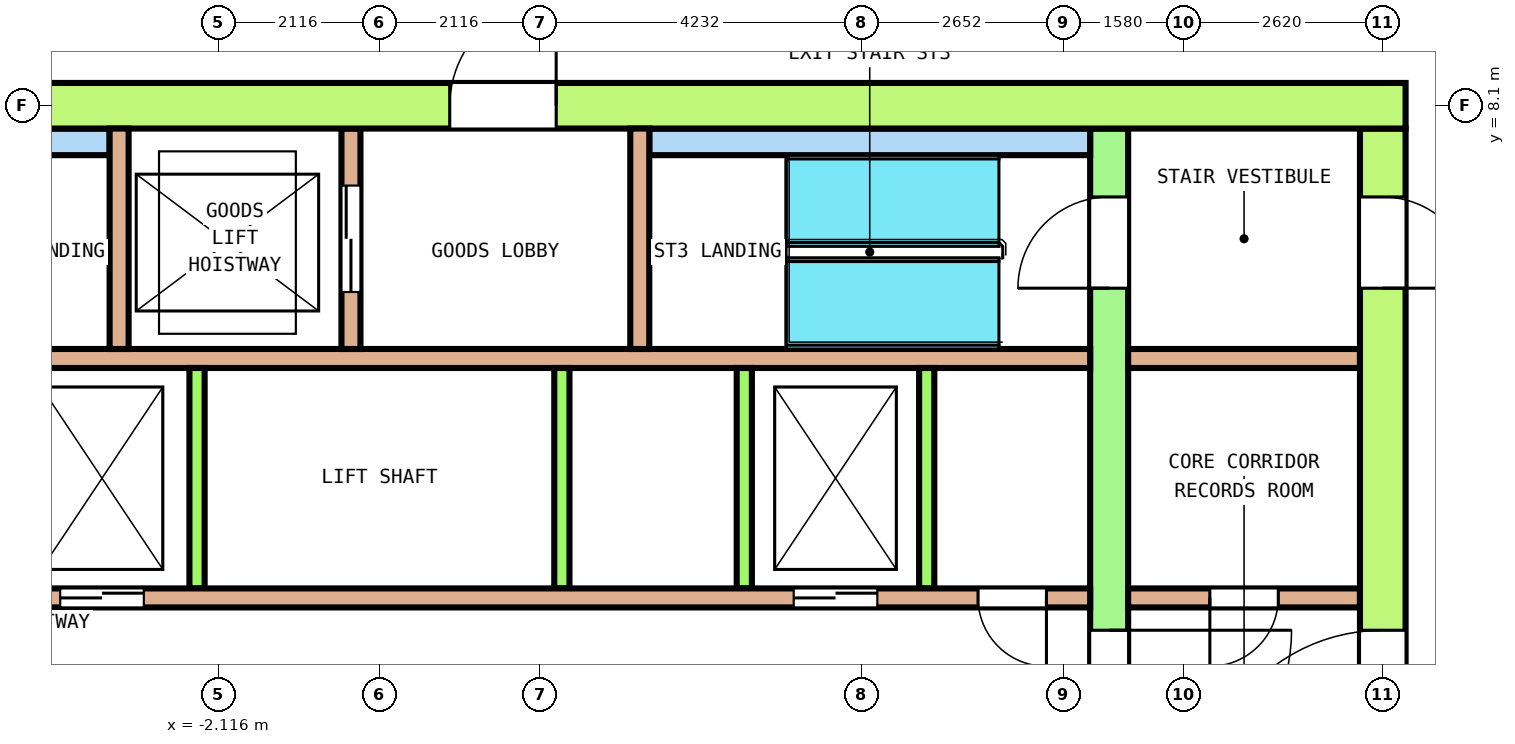
"""IFC4 building model, lengths in metres.
Left out: names, types, materials, properties, quantities, classifications, styles, units other than length and angle.
Written with IfcOpenShell. Run it as: python <this file> out.ifc"""

import sys

from ifc_helpers import new_model, si_unit, direction, frame, frame_2d, origin, place, context, subcontext, project, spatial, rectangle, extrude, element, fill, save


model = new_model("IFC4")
c1 = context("Model", 3, precision=1e-05, world=origin(), true_north=direction((0.0, 1.0)))
c2 = subcontext(c1, "Body", "Model", "MODEL_VIEW")
j1 = project(units=[si_unit("LENGTHUNIT", "METRE"), si_unit("PLANEANGLEUNIT", "RADIAN")], contexts=[c1])
p1 = place(None, origin())
s1 = spatial("IfcSite", under=j1, at=p1, CompositionType="ELEMENT")
p2 = place(p1, origin())
s2 = spatial("IfcBuilding", under=s1, at=p2, CompositionType="ELEMENT")
p3 = place(p2, frame((0.0, 0.0, 219.4)))
s3 = spatial("IfcBuildingStorey", under=s2, at=p3, CompositionType="ELEMENT", Elevation=219.4)
p4 = place(p3, frame((-13.5, 8.1, 0.0), z_axis=(0.0, 0.0, 1.0), x_axis=(1.0, 0.0, 0.0)))
e1 = element("IfcWall", 1, at=p4, inside=s3, PredefinedType="SHEAR", context=c2, shape_type="SweptSolid", body=[
    extrude(rectangle(XDim=27.0, YDim=0.6, at=frame_2d((13.5, 0.0))), origin(), (0.0, 0.0, 1.0), 3.7),
])
p5 = place(p4, frame((14.425, 0.0, 0.0)))
e2 = element("IfcOpeningElement", 2, at=p5, cuts=e1, PredefinedType="OPENING", context=c2, shape_type="SweptSolid", body=[
    extrude(rectangle(XDim=1.4, YDim=2.1, at=frame_2d((0.7, 1.05))), frame((0.0, 0.31, 0.0), z_axis=(0.0, -1.0, 0.0), x_axis=(1.0, 0.0, 0.0)), (0.0, 0.0, 1.0), 0.62),
])
p6 = place(p3, frame((13.2, -7.8, 0.0), z_axis=(0.0, 0.0, 1.0), x_axis=(0.0, 1.0, 0.0)))
e3 = element("IfcWall", 3, at=p6, inside=s3, PredefinedType="SHEAR", context=c2, shape_type="SweptSolid", body=[
    extrude(rectangle(XDim=15.6, YDim=0.6, at=frame_2d((7.8, 0.0))), origin(), (0.0, 0.0, 1.0), 3.7),
])
p7 = place(p6, frame((6.6, 0.0, 0.0)))
e4 = element("IfcOpeningElement", 4, at=p7, cuts=e3, PredefinedType="OPENING", context=c2, shape_type="SweptSolid", body=[
    extrude(rectangle(XDim=2.4, YDim=2.1, at=frame_2d((1.2, 1.05))), frame((0.0, 0.31, 0.0), z_axis=(0.0, -1.0, 0.0), x_axis=(1.0, 0.0, 0.0)), (0.0, 0.0, 1.0), 0.62),
])
p8 = place(p6, frame((13.5, 0.0, 0.0)))
e5 = element("IfcOpeningElement", 5, at=p8, cuts=e3, PredefinedType="OPENING", context=c2, shape_type="SweptSolid", body=[
    extrude(rectangle(XDim=1.2, YDim=2.1, at=frame_2d((0.6, 1.05))), frame((0.0, 0.31, 0.0), z_axis=(0.0, -1.0, 0.0), x_axis=(1.0, 0.0, 0.0)), (0.0, 0.0, 1.0), 0.62),
])
p9 = place(p6, frame((1.0, 0.0, 0.0)))
e6 = element("IfcOpeningElement", 6, at=p9, cuts=e3, PredefinedType="OPENING", context=c2, shape_type="SweptSolid", body=[
    extrude(rectangle(XDim=1.0, YDim=2.1, at=frame_2d((0.5, 1.05))), frame((0.0, 0.31, 0.0), z_axis=(0.0, -1.0, 0.0), x_axis=(1.0, 0.0, 0.0)), (0.0, 0.0, 1.0), 0.62),
])
p10 = place(p3, frame((9.6, -7.8, 0.0), z_axis=(0.0, 0.0, 1.0), x_axis=(0.0, 1.0, 0.0)))
e7 = element("IfcWall", 7, at=p10, inside=s3, PredefinedType="SHEAR", context=c2, shape_type="SweptSolid", body=[
    extrude(rectangle(XDim=15.6, YDim=0.5, at=frame_2d((7.8, 0.0))), origin(), (0.0, 0.0, 1.0), 3.7),
])
p11 = place(p10, frame((6.6, 0.0, 0.0)))
e8 = element("IfcOpeningElement", 8, at=p11, cuts=e7, PredefinedType="OPENING", context=c2, shape_type="SweptSolid", body=[
    extrude(rectangle(XDim=2.4, YDim=2.1, at=frame_2d((1.2, 1.05))), frame((0.0, 0.26, 0.0), z_axis=(0.0, -1.0, 0.0), x_axis=(1.0, 0.0, 0.0)), (0.0, 0.0, 1.0), 0.52),
])
p12 = place(p10, frame((13.5, 0.0, 0.0)))
e9 = element("IfcOpeningElement", 9, at=p12, cuts=e7, PredefinedType="OPENING", context=c2, shape_type="SweptSolid", body=[
    extrude(rectangle(XDim=1.2, YDim=2.1, at=frame_2d((0.6, 1.05))), frame((0.0, 0.26, 0.0), z_axis=(0.0, -1.0, 0.0), x_axis=(1.0, 0.0, 0.0)), (0.0, 0.0, 1.0), 0.52),
])
p13 = place(p10, frame((1.0, 0.0, 0.0)))
e10 = element("IfcOpeningElement", 10, at=p13, cuts=e7, PredefinedType="OPENING", context=c2, shape_type="SweptSolid", body=[
    extrude(rectangle(XDim=1.0, YDim=2.1, at=frame_2d((0.5, 1.05))), frame((0.0, 0.26, 0.0), z_axis=(0.0, -1.0, 0.0), x_axis=(1.0, 0.0, 0.0)), (0.0, 0.0, 1.0), 0.52),
])
p14 = place(p3, frame((-9.35, 1.625, 0.0), z_axis=(0.0, 0.0, 1.0), x_axis=(1.0, 0.0, 0.0)))
e11 = element("IfcWall", 11, at=p14, inside=s3, PredefinedType="SOLIDWALL", context=c2, shape_type="SweptSolid", body=[
    extrude(rectangle(XDim=18.7, YDim=0.25, at=frame_2d((9.35, 0.0))), origin(), (0.0, 0.0, 1.0), 3.7),
])
p15 = place(p14, frame((2.85, 0.0, 0.0)))
e12 = element("IfcOpeningElement", 12, at=p15, cuts=e11, PredefinedType="OPENING", context=c2, shape_type="SweptSolid", body=[
    extrude(rectangle(XDim=1.1, YDim=2.1, at=frame_2d((0.55, 1.05))), frame((0.0, 0.135, 0.0), z_axis=(0.0, -1.0, 0.0), x_axis=(1.0, 0.0, 0.0)), (0.0, 0.0, 1.0), 0.27),
])
p16 = place(p14, frame((5.15, 0.0, 0.0)))
e13 = element("IfcOpeningElement", 13, at=p16, cuts=e11, PredefinedType="OPENING", context=c2, shape_type="SweptSolid", body=[
    extrude(rectangle(XDim=1.1, YDim=2.1, at=frame_2d((0.55, 1.05))), frame((0.0, 0.135, 0.0), z_axis=(0.0, -1.0, 0.0), x_axis=(1.0, 0.0, 0.0)), (0.0, 0.0, 1.0), 0.27),
])
p17 = place(p14, frame((14.8, 0.0, 0.0)))
e14 = element("IfcOpeningElement", 14, at=p17, cuts=e11, PredefinedType="OPENING", context=c2, shape_type="SweptSolid", body=[
    extrude(rectangle(XDim=1.1, YDim=2.1, at=frame_2d((0.55, 1.05))), frame((0.0, 0.135, 0.0), z_axis=(0.0, -1.0, 0.0), x_axis=(1.0, 0.0, 0.0)), (0.0, 0.0, 1.0), 0.27),
])
p18 = place(p14, frame((0.575, 0.0, 0.0)))
e15 = element("IfcOpeningElement", 15, at=p18, cuts=e11, PredefinedType="OPENING", context=c2, shape_type="SweptSolid", body=[
    extrude(rectangle(XDim=0.9, YDim=2.1, at=frame_2d((0.45, 1.05))), frame((0.0, 0.135, 0.0), z_axis=(0.0, -1.0, 0.0), x_axis=(1.0, 0.0, 0.0)), (0.0, 0.0, 1.0), 0.27),
])
p19 = place(p14, frame((17.225, 0.0, 0.0)))
e16 = element("IfcOpeningElement", 16, at=p19, cuts=e11, PredefinedType="OPENING", context=c2, shape_type="SweptSolid", body=[
    extrude(rectangle(XDim=0.9, YDim=2.1, at=frame_2d((0.45, 1.05))), frame((0.0, 0.135, 0.0), z_axis=(0.0, -1.0, 0.0), x_axis=(1.0, 0.0, 0.0)), (0.0, 0.0, 1.0), 0.27),
])
p20 = place(p3, frame((9.85, 1.625, 0.0), z_axis=(0.0, 0.0, 1.0), x_axis=(1.0, 0.0, 0.0)))
e17 = element("IfcWall", 17, at=p20, inside=s3, PredefinedType="SOLIDWALL", context=c2, shape_type="SweptSolid", body=[
    extrude(rectangle(XDim=3.05, YDim=0.25, at=frame_2d((1.525, 0.0))), origin(), (0.0, 0.0, 1.0), 3.7),
])
p21 = place(p20, frame((1.075, 0.0, 0.0)))
e18 = element("IfcOpeningElement", 18, at=p21, cuts=e17, PredefinedType="OPENING", context=c2, shape_type="SweptSolid", body=[
    extrude(rectangle(XDim=0.9, YDim=2.1, at=frame_2d((0.45, 1.05))), frame((0.0, 0.135, 0.0), z_axis=(0.0, -1.0, 0.0), x_axis=(1.0, 0.0, 0.0)), (0.0, 0.0, 1.0), 0.27),
])
p22 = place(p3, frame((-9.35, 4.775, 0.0), z_axis=(0.0, 0.0, 1.0), x_axis=(1.0, 0.0, 0.0)))
e19 = element("IfcWall", 19, at=p22, inside=s3, PredefinedType="SOLIDWALL", context=c2, shape_type="SweptSolid", body=[
    extrude(rectangle(XDim=18.7, YDim=0.25, at=frame_2d((9.35, 0.0))), origin(), (0.0, 0.0, 1.0), 3.7),
])
p23 = place(p3, frame((9.85, 4.775, 0.0), z_axis=(0.0, 0.0, 1.0), x_axis=(1.0, 0.0, 0.0)))
e20 = element("IfcWall", 20, at=p23, inside=s3, PredefinedType="SOLIDWALL", context=c2, shape_type="SweptSolid", body=[
    extrude(rectangle(XDim=3.05, YDim=0.25, at=frame_2d((1.525, 0.0))), origin(), (0.0, 0.0, 1.0), 3.7),
])
for number, where, z_axis, x_axis in (
    (21, (-2.4, 1.75, 0.0), (0.0, 0.0, 1.0), (0.0, 1.0, 0.0)),
    (22, (2.4, 1.75, 0.0), (0.0, 0.0, 1.0), (0.0, 1.0, 0.0)),
    (23, (4.8, 1.75, 0.0), (0.0, 0.0, 1.0), (0.0, 1.0, 0.0)),
    (24, (7.2, 1.75, 0.0), (0.0, 0.0, 1.0), (0.0, 1.0, 0.0)),
):
    element("IfcWall", number, at=place(p3, frame(where, z_axis=z_axis, x_axis=x_axis)), inside=s3, PredefinedType="SOLIDWALL", context=c2, shape_type="SweptSolid", body=[
        extrude(rectangle(XDim=2.9, YDim=0.2, at=frame_2d((1.45, 0.0))), origin(), (0.0, 0.0, 1.0), 3.7),
    ])
for number, where, z_axis, x_axis in (
    (25, (-9.35, 7.625, 0.0), (0.0, 0.0, 1.0), (1.0, 0.0, 0.0)),
    (26, (3.55, 7.625, 0.0), (0.0, 0.0, 1.0), (1.0, 0.0, 0.0)),
):
    element("IfcWall", number, at=place(p3, frame(where, z_axis=z_axis, x_axis=x_axis)), inside=s3, PredefinedType="SOLIDWALL", context=c2, shape_type="SweptSolid", body=[
        extrude(rectangle(XDim=5.8, YDim=0.35, at=frame_2d((2.9, 0.0))), origin(), (0.0, 0.0, 1.0), 3.7),
    ])
p24 = place(p3, frame((-3.425, 4.9, 0.0), z_axis=(0.0, 0.0, 1.0), x_axis=(0.0, 1.0, 0.0)))
e27 = element("IfcWall", 27, at=p24, inside=s3, PredefinedType="SOLIDWALL", context=c2, shape_type="SweptSolid", body=[
    extrude(rectangle(XDim=2.9, YDim=0.25, at=frame_2d((1.45, 0.0))), origin(), (0.0, 0.0, 1.0), 3.7),
])
p25 = place(p3, frame((-0.375, 4.9, 0.0), z_axis=(0.0, 0.0, 1.0), x_axis=(0.0, 1.0, 0.0)))
e28 = element("IfcWall", 28, at=p25, inside=s3, PredefinedType="SOLIDWALL", context=c2, shape_type="SweptSolid", body=[
    extrude(rectangle(XDim=2.9, YDim=0.25, at=frame_2d((1.45, 0.0))), origin(), (0.0, 0.0, 1.0), 3.7),
])
p26 = place(p25, frame((0.75, 0.0, 0.0)))
e29 = element("IfcOpeningElement", 29, at=p26, cuts=e28, PredefinedType="OPENING", context=c2, shape_type="SweptSolid", body=[
    extrude(rectangle(XDim=1.4, YDim=2.1, at=frame_2d((0.7, 1.05))), frame((0.0, 0.135, 0.0), z_axis=(0.0, -1.0, 0.0), x_axis=(1.0, 0.0, 0.0)), (0.0, 0.0, 1.0), 0.27),
])
p27 = place(p3, frame((3.425, 4.9, 0.0), z_axis=(0.0, 0.0, 1.0), x_axis=(0.0, 1.0, 0.0)))
e30 = element("IfcWall", 30, at=p27, inside=s3, PredefinedType="SOLIDWALL", context=c2, shape_type="SweptSolid", body=[
    extrude(rectangle(XDim=2.9, YDim=0.25, at=frame_2d((1.45, 0.0))), origin(), (0.0, 0.0, 1.0), 3.7),
])
p28 = place(p16, origin())
e31 = element("IfcDoor", 31, at=p28, inside=s3, OperationType="DOUBLE_DOOR_SLIDING", PredefinedType="DOOR", context=c2, shape_type="SweptSolid", body=[
    extrude(rectangle(XDim=1.1, YDim=2.1, at=frame_2d((0.55, 1.05))), frame((0.0, 0.075, 0.0), z_axis=(0.0, -1.0, 0.0), x_axis=(1.0, 0.0, 0.0)), (0.0, 0.0, 1.0), 0.15),
])
fill(e13, e31)
p29 = place(p17, origin())
e32 = element("IfcDoor", 32, at=p29, inside=s3, OperationType="DOUBLE_DOOR_SLIDING", PredefinedType="DOOR", context=c2, shape_type="SweptSolid", body=[
    extrude(rectangle(XDim=1.1, YDim=2.1, at=frame_2d((0.55, 1.05))), frame((0.0, 0.075, 0.0), z_axis=(0.0, -1.0, 0.0), x_axis=(1.0, 0.0, 0.0)), (0.0, 0.0, 1.0), 0.15),
])
fill(e14, e32)
p30 = place(p26, origin())
e33 = element("IfcDoor", 33, at=p30, inside=s3, OperationType="DOUBLE_DOOR_SLIDING", PredefinedType="DOOR", context=c2, shape_type="SweptSolid", body=[
    extrude(rectangle(XDim=1.4, YDim=2.1, at=frame_2d((0.7, 1.05))), frame((0.0, 0.075, 0.0), z_axis=(0.0, -1.0, 0.0), x_axis=(1.0, 0.0, 0.0)), (0.0, 0.0, 1.0), 0.15),
])
fill(e29, e33)
p31 = place(p11, origin())
e34 = element("IfcDoor", 34, at=p31, inside=s3, OperationType="DOUBLE_DOOR_SINGLE_SWING", PredefinedType="DOOR", context=c2, shape_type="SweptSolid", body=[
    extrude(rectangle(XDim=2.4, YDim=2.1, at=frame_2d((1.2, 1.05))), frame((0.0, 0.2, 0.0), z_axis=(0.0, -1.0, 0.0), x_axis=(1.0, 0.0, 0.0)), (0.0, 0.0, 1.0), 0.4),
])
fill(e8, e34)
p32 = place(p7, origin())
e35 = element("IfcDoor", 35, at=p32, inside=s3, OperationType="DOUBLE_DOOR_SINGLE_SWING", PredefinedType="DOOR", context=c2, shape_type="SweptSolid", body=[
    extrude(rectangle(XDim=2.4, YDim=2.1, at=frame_2d((1.2, 1.05))), frame((0.0, 0.25, 0.0), z_axis=(0.0, -1.0, 0.0), x_axis=(1.0, 0.0, 0.0)), (0.0, 0.0, 1.0), 0.5),
])
fill(e4, e35)
p33 = place(p12, origin())
e36 = element("IfcDoor", 36, at=p33, inside=s3, OperationType="SINGLE_SWING_RIGHT", PredefinedType="DOOR", context=c2, shape_type="SweptSolid", body=[
    extrude(rectangle(XDim=1.2, YDim=2.1, at=frame_2d((0.6, 1.05))), frame((0.0, 0.2, 0.0), z_axis=(0.0, -1.0, 0.0), x_axis=(1.0, 0.0, 0.0)), (0.0, 0.0, 1.0), 0.4),
])
fill(e9, e36)
p34 = place(p8, origin())
e37 = element("IfcDoor", 37, at=p34, inside=s3, OperationType="SINGLE_SWING_LEFT", PredefinedType="DOOR", context=c2, shape_type="SweptSolid", body=[
    extrude(rectangle(XDim=1.2, YDim=2.1, at=frame_2d((0.6, 1.05))), frame((0.0, 0.25, 0.0), z_axis=(0.0, -1.0, 0.0), x_axis=(1.0, 0.0, 0.0)), (0.0, 0.0, 1.0), 0.5),
])
fill(e5, e37)
p35 = place(p5, origin())
e38 = element("IfcDoor", 38, at=p35, inside=s3, OperationType="DOUBLE_DOOR_SINGLE_SWING", PredefinedType="DOOR", context=c2, shape_type="SweptSolid", body=[
    extrude(rectangle(XDim=1.4, YDim=2.1, at=frame_2d((0.7, 1.05))), frame((0.0, 0.25, 0.0), z_axis=(0.0, -1.0, 0.0), x_axis=(1.0, 0.0, 0.0)), (0.0, 0.0, 1.0), 0.5),
])
fill(e2, e38)
p36 = place(p19, origin())
e39 = element("IfcDoor", 39, at=p36, inside=s3, OperationType="SINGLE_SWING_RIGHT", PredefinedType="DOOR", context=c2, shape_type="SweptSolid", body=[
    extrude(rectangle(XDim=0.9, YDim=2.1, at=frame_2d((0.45, 1.05))), frame((0.0, 0.075, 0.0), z_axis=(0.0, -1.0, 0.0), x_axis=(1.0, 0.0, 0.0)), (0.0, 0.0, 1.0), 0.15),
])
fill(e16, e39)
p37 = place(p21, origin())
e40 = element("IfcDoor", 40, at=p37, inside=s3, OperationType="SINGLE_SWING_LEFT", PredefinedType="DOOR", context=c2, shape_type="SweptSolid", body=[
    extrude(rectangle(XDim=0.9, YDim=2.1, at=frame_2d((0.45, 1.05))), frame((0.0, 0.075, 0.0), z_axis=(0.0, -1.0, 0.0), x_axis=(1.0, 0.0, 0.0)), (0.0, 0.0, 1.0), 0.15),
])
fill(e18, e40)
save(model, sys.argv[1])
